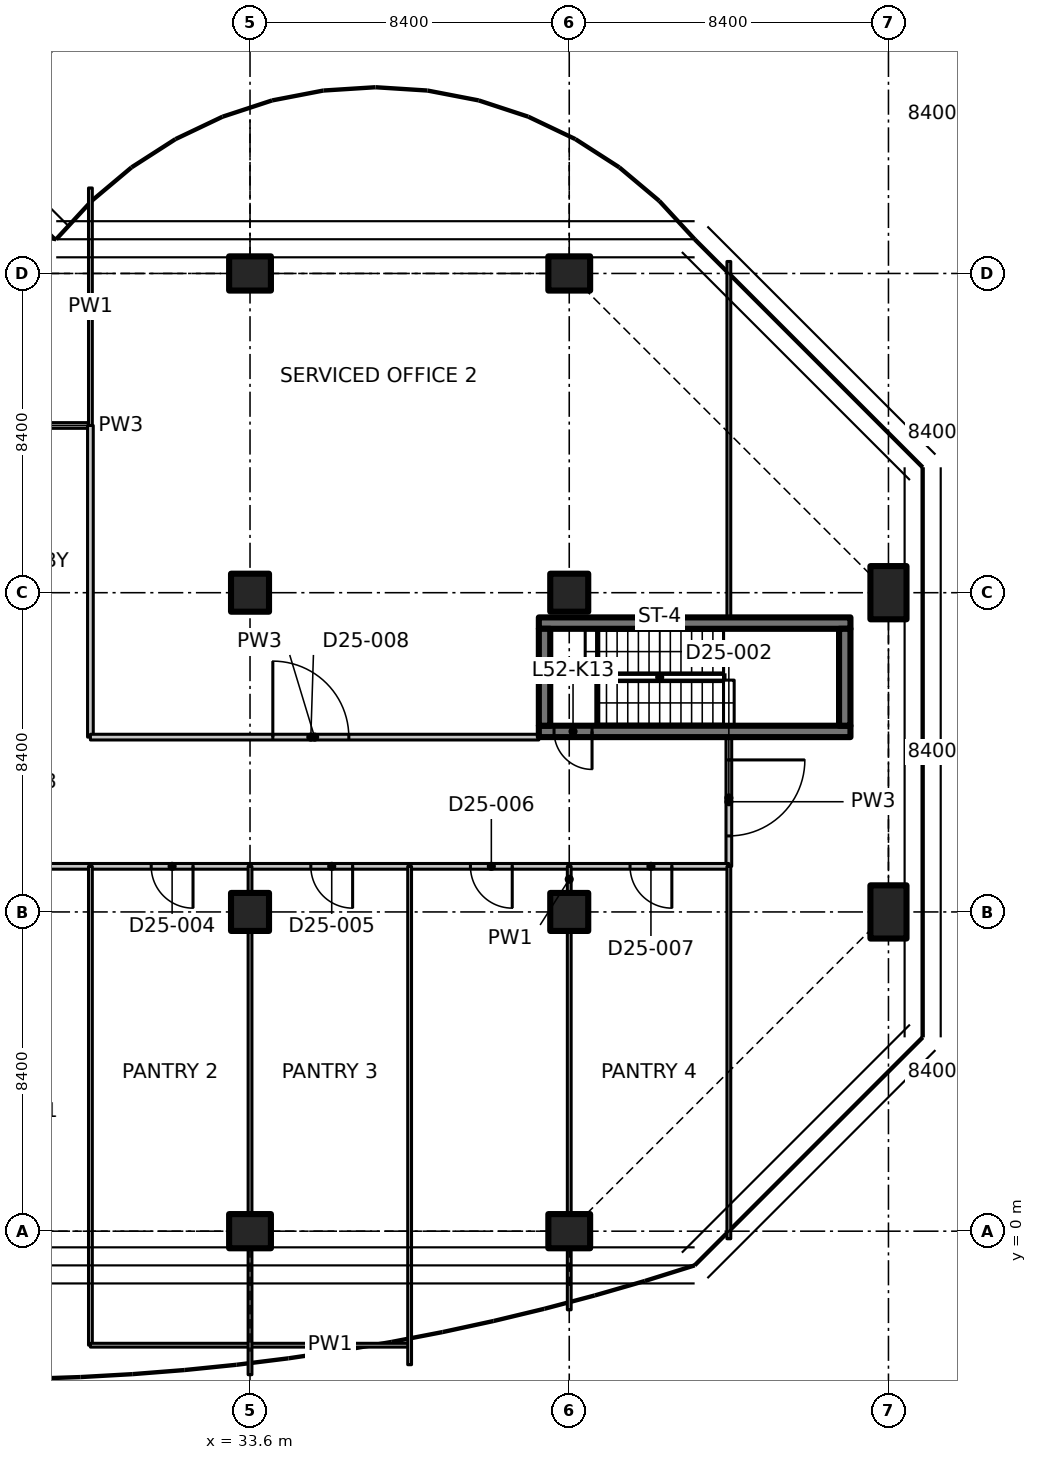
"""IFC4 building model, lengths in metres.
Left out: names, types, materials, properties, quantities, classifications, styles, units other than length and angle.
Written with IfcOpenShell. Run it as: python <this file> out.ifc"""

import sys

from ifc_helpers import new_model, si_unit, direction, frame, frame_2d, origin, origin_2d, place, context, subcontext, project, spatial, polyline, rectangle, outline, extrude, element, fill, save


model = new_model("IFC4")
c1 = context("Model", 3, precision=1e-05, world=origin(), true_north=direction((0.0, 1.0)))
c2 = subcontext(c1, "Body", "Model", "MODEL_VIEW")
j1 = project(units=[si_unit("LENGTHUNIT", "METRE"), si_unit("PLANEANGLEUNIT", "RADIAN")], contexts=[c1])
p1 = place(None, origin())
s1 = spatial("IfcSite", under=j1, at=p1, CompositionType="ELEMENT")
p2 = place(p1, origin())
s2 = spatial("IfcBuilding", under=s1, at=p2, CompositionType="ELEMENT")
p3 = place(p2, frame((0.0, 0.0, 206.4)))
s3 = spatial("IfcBuildingStorey", under=s2, at=p3, CompositionType="ELEMENT", Elevation=206.4)
p4 = place(p3, frame((33.6, 0.0, 0.0), z_axis=(0.0, 0.0, 1.0), x_axis=(0.0, 1.0, 0.0)))
e1 = element("IfcColumn", 1, at=p4, inside=s3, PredefinedType="COLUMN", context=c2, shape_type="SweptSolid", body=[
    extrude(rectangle(XDim=0.9, YDim=1.1, at=origin_2d()), origin(), (0.0, 0.0, 1.0), 4.2),
])
for number, where, z_axis, x_axis in (
    (2, (33.6, 8.4, 0.0), (0.0, 0.0, 1.0), (1.0, 0.0, 0.0)),
    (3, (33.6, 16.8, 0.0), (0.0, 0.0, 1.0), (1.0, 0.0, 0.0)),
):
    element("IfcColumn", number, at=place(p3, frame(where, z_axis=z_axis, x_axis=x_axis)), inside=s3, PredefinedType="COLUMN", context=c2, shape_type="SweptSolid", body=[
        extrude(rectangle(XDim=1.0, YDim=1.0, at=origin_2d()), origin(), (0.0, 0.0, 1.0), 4.2),
    ])
for number, where, z_axis, x_axis in (
    (4, (33.6, 25.2, 0.0), (0.0, 0.0, 1.0), (0.0, 1.0, 0.0)),
    (5, (42.0, 0.0, 0.0), (0.0, 0.0, 1.0), (0.0, 1.0, 0.0)),
):
    element("IfcColumn", number, at=place(p3, frame(where, z_axis=z_axis, x_axis=x_axis)), inside=s3, PredefinedType="COLUMN", context=c2, shape_type="SweptSolid", body=[
        extrude(rectangle(XDim=0.9, YDim=1.1, at=origin_2d()), origin(), (0.0, 0.0, 1.0), 4.2),
    ])
for number, where, z_axis, x_axis in (
    (6, (42.0, 8.4, 0.0), (0.0, 0.0, 1.0), (1.0, 0.0, 0.0)),
    (7, (42.0, 16.8, 0.0), (0.0, 0.0, 1.0), (1.0, 0.0, 0.0)),
):
    element("IfcColumn", number, at=place(p3, frame(where, z_axis=z_axis, x_axis=x_axis)), inside=s3, PredefinedType="COLUMN", context=c2, shape_type="SweptSolid", body=[
        extrude(rectangle(XDim=1.0, YDim=1.0, at=origin_2d()), origin(), (0.0, 0.0, 1.0), 4.2),
    ])
p5 = place(p3, frame((42.0, 25.2, 0.0), z_axis=(0.0, 0.0, 1.0), x_axis=(0.0, 1.0, 0.0)))
e8 = element("IfcColumn", 8, at=p5, inside=s3, PredefinedType="COLUMN", context=c2, shape_type="SweptSolid", body=[
    extrude(rectangle(XDim=0.9, YDim=1.1, at=origin_2d()), origin(), (0.0, 0.0, 1.0), 4.2),
])
for number, where, z_axis, x_axis in (
    (9, (50.4, 8.4, 0.0), (0.0, 0.0, 1.0), (1.0, 0.0, 0.0)),
    (10, (50.4, 16.8, 0.0), (0.0, 0.0, 1.0), (1.0, 0.0, 0.0)),
):
    element("IfcColumn", number, at=place(p3, frame(where, z_axis=z_axis, x_axis=x_axis)), inside=s3, PredefinedType="COLUMN", context=c2, shape_type="SweptSolid", body=[
        extrude(rectangle(XDim=0.95, YDim=1.4, at=origin_2d()), origin(), (0.0, 0.0, 1.0), 4.2),
    ])
p6 = place(p3, frame((27.338, 31.223, 0.0), z_axis=(0.0, 0.0, 1.0), x_axis=(0.540768998311, 0.841171142197, 0.0)))
e11 = element("IfcWall", 11, at=p6, inside=s3, PredefinedType="PARAPET", context=c2, shape_type="SweptSolid", body=[
    extrude(rectangle(XDim=1.082, YDim=1.2, at=frame_2d((0.541, 0.0))), origin(), (0.0, 0.0, 1.0), 1.3),
])
p7 = place(p3, frame((49.4, 13.15, 0.0), z_axis=(0.0, 0.0, 1.0), x_axis=(-1.0, 0.0, 0.0)))
e12 = element("IfcWall", 12, at=p7, inside=s3, PredefinedType="SHEAR", context=c2, shape_type="SweptSolid", body=[
    extrude(rectangle(XDim=8.2, YDim=0.3, at=frame_2d((4.1, 0.0))), origin(), (0.0, 0.0, 1.0), 4.2),
])
p8 = place(p7, frame((6.8, 0.0, 0.0)))
e13 = element("IfcOpeningElement", 13, at=p8, cuts=e12, PredefinedType="OPENING", context=c2, shape_type="SweptSolid", body=[
    extrude(rectangle(XDim=1.0, YDim=2.1, at=frame_2d((0.5, 1.05))), frame((0.0, 0.16, 0.0), z_axis=(0.0, -1.0, 0.0), x_axis=(1.0, 0.0, 0.0)), (0.0, 0.0, 1.0), 0.32),
])
p9 = place(p3, frame((41.2, 16.0, 0.0), z_axis=(0.0, 0.0, 1.0), x_axis=(1.0, 0.0, 0.0)))
e14 = element("IfcWall", 14, at=p9, inside=s3, PredefinedType="SHEAR", context=c2, shape_type="SweptSolid", body=[
    extrude(rectangle(XDim=8.2, YDim=0.3, at=frame_2d((4.1, 0.0))), origin(), (0.0, 0.0, 1.0), 4.2),
])
for number, where, z_axis, x_axis in (
    (15, (41.35, 13.3, 0.0), (0.0, 0.0, 1.0), (0.0, 1.0, 0.0)),
    (16, (49.25, 13.3, 0.0), (0.0, 0.0, 1.0), (0.0, 1.0, 0.0)),
):
    element("IfcWall", number, at=place(p3, frame(where, z_axis=z_axis, x_axis=x_axis)), inside=s3, PredefinedType="SHEAR", context=c2, shape_type="SweptSolid", body=[
        extrude(rectangle(XDim=2.55, YDim=0.3, at=frame_2d((1.275, 0.0))), origin(), (0.0, 0.0, 1.0), 4.2),
    ])
p10 = place(p3, frame((25.2, 21.2, 0.0), z_axis=(0.0, 0.0, 1.0), x_axis=(1.0, 0.0, 0.0)))
e17 = element("IfcWall", 17, at=p10, inside=s3, PredefinedType="PARTITIONING", context=c2, shape_type="SweptSolid", body=[
    extrude(rectangle(XDim=4.2, YDim=0.15, at=frame_2d((2.1, 0.0))), origin(), (0.0, 0.0, 1.0), 4.18),
])
p11 = place(p10, frame((1.5, 0.0, 0.0)))
e18 = element("IfcOpeningElement", 18, at=p11, cuts=e17, PredefinedType="OPENING", context=c2, shape_type="SweptSolid", body=[
    extrude(rectangle(XDim=1.0, YDim=2.1, at=frame_2d((0.5, 1.05))), frame((0.0, 0.085, 0.0), z_axis=(0.0, -1.0, 0.0), x_axis=(1.0, 0.0, 0.0)), (0.0, 0.0, 1.0), 0.17),
])
p12 = place(p3, frame((29.4, 9.6, 0.0), z_axis=(0.0, 0.0, 1.0), x_axis=(-1.0, 0.0, 0.0)))
e19 = element("IfcWall", 19, at=p12, inside=s3, PredefinedType="PARTITIONING", context=c2, shape_type="SweptSolid", body=[
    extrude(rectangle(XDim=4.2, YDim=0.15, at=frame_2d((2.1, 0.0))), origin(), (0.0, 0.0, 1.0), 4.18),
])
p13 = place(p12, frame((1.2, 0.0, 0.0)))
e20 = element("IfcOpeningElement", 20, at=p13, cuts=e19, PredefinedType="OPENING", context=c2, shape_type="SweptSolid", body=[
    extrude(rectangle(XDim=1.6, YDim=2.1, at=frame_2d((0.8, 1.05))), frame((0.0, 0.085, 0.0), z_axis=(0.0, -1.0, 0.0), x_axis=(1.0, 0.0, 0.0)), (0.0, 0.0, 1.0), 0.17),
])
p14 = place(p3, frame((29.4, 21.2, 0.0), z_axis=(0.0, 0.0, 1.0), x_axis=(0.0, -1.0, 0.0)))
e21 = element("IfcWall", 21, at=p14, inside=s3, PredefinedType="PARTITIONING", context=c2, shape_type="SweptSolid", body=[
    extrude(rectangle(XDim=8.2, YDim=0.15, at=frame_2d((4.1, 0.0))), origin(), (0.0, 0.0, 1.0), 4.18),
])
p15 = place(p3, frame((29.4, 27.449, 0.0), z_axis=(0.0, 0.0, 1.0), x_axis=(0.0, -1.0, 0.0)))
e22 = element("IfcWall", 22, at=p15, inside=s3, PredefinedType="PARTITIONING", context=c2, shape_type="SweptSolid", body=[
    extrude(outline(polyline([(0.0, 0.0), (6.25, 0.0), (6.249, 4.18), (2.699, 4.18), (2.697, 3.83), (1.801, 3.83), (1.799, 4.18), (0.174, 4.18), (0.0, 4.18), (0.0, 0.0)])), frame((0.0, 0.05, 0.0), z_axis=(0.0, -1.0, 0.0), x_axis=(1.0, 0.0, 0.0)), (0.0, 0.0, 1.0), 0.1),
])
p16 = place(p3, frame((46.2, 13.0, 0.0), z_axis=(0.0, 0.0, 1.0), x_axis=(0.0, -1.0, 0.0)))
e23 = element("IfcWall", 23, at=p16, inside=s3, PredefinedType="PARTITIONING", context=c2, shape_type="SweptSolid", body=[
    extrude(rectangle(XDim=3.4, YDim=0.15, at=frame_2d((1.7, 0.0))), origin(), (0.0, 0.0, 1.0), 4.18),
])
p17 = place(p16, frame((0.6, 0.0, 0.0)))
e24 = element("IfcOpeningElement", 24, at=p17, cuts=e23, PredefinedType="OPENING", context=c2, shape_type="SweptSolid", body=[
    extrude(rectangle(XDim=2.0, YDim=2.4, at=frame_2d((1.0, 1.2))), frame((0.0, 0.085, 0.0), z_axis=(0.0, -1.0, 0.0), x_axis=(1.0, 0.0, 0.0)), (0.0, 0.0, 1.0), 0.17),
])
p18 = place(p3, frame((33.6, 9.6, 0.0), z_axis=(0.0, 0.0, 1.0), x_axis=(-1.0, 0.0, 0.0)))
e25 = element("IfcWall", 25, at=p18, inside=s3, PredefinedType="PARTITIONING", context=c2, shape_type="SweptSolid", body=[
    extrude(rectangle(XDim=4.2, YDim=0.15, at=frame_2d((2.1, 0.0))), origin(), (0.0, 0.0, 1.0), 4.18),
])
p19 = place(p18, frame((1.5, 0.0, 0.0)))
e26 = element("IfcOpeningElement", 26, at=p19, cuts=e25, PredefinedType="OPENING", context=c2, shape_type="SweptSolid", body=[
    extrude(rectangle(XDim=1.1, YDim=2.1, at=frame_2d((0.55, 1.05))), frame((0.0, 0.085, 0.0), z_axis=(0.0, -1.0, 0.0), x_axis=(1.0, 0.0, 0.0)), (0.0, 0.0, 1.0), 0.17),
])
p20 = place(p3, frame((37.8, 9.6, 0.0), z_axis=(0.0, 0.0, 1.0), x_axis=(-1.0, 0.0, 0.0)))
e27 = element("IfcWall", 27, at=p20, inside=s3, PredefinedType="PARTITIONING", context=c2, shape_type="SweptSolid", body=[
    extrude(rectangle(XDim=4.2, YDim=0.15, at=frame_2d((2.1, 0.0))), origin(), (0.0, 0.0, 1.0), 4.18),
])
p21 = place(p20, frame((1.5, 0.0, 0.0)))
e28 = element("IfcOpeningElement", 28, at=p21, cuts=e27, PredefinedType="OPENING", context=c2, shape_type="SweptSolid", body=[
    extrude(rectangle(XDim=1.1, YDim=2.1, at=frame_2d((0.55, 1.05))), frame((0.0, 0.085, 0.0), z_axis=(0.0, -1.0, 0.0), x_axis=(1.0, 0.0, 0.0)), (0.0, 0.0, 1.0), 0.17),
])
p22 = place(p3, frame((42.0, 9.6, 0.0), z_axis=(0.0, 0.0, 1.0), x_axis=(-1.0, 0.0, 0.0)))
e29 = element("IfcWall", 29, at=p22, inside=s3, PredefinedType="PARTITIONING", context=c2, shape_type="SweptSolid", body=[
    extrude(rectangle(XDim=4.2, YDim=0.15, at=frame_2d((2.1, 0.0))), origin(), (0.0, 0.0, 1.0), 4.18),
])
p23 = place(p22, frame((1.5, 0.0, 0.0)))
e30 = element("IfcOpeningElement", 30, at=p23, cuts=e29, PredefinedType="OPENING", context=c2, shape_type="SweptSolid", body=[
    extrude(rectangle(XDim=1.1, YDim=2.1, at=frame_2d((0.55, 1.05))), frame((0.0, 0.085, 0.0), z_axis=(0.0, -1.0, 0.0), x_axis=(1.0, 0.0, 0.0)), (0.0, 0.0, 1.0), 0.17),
])
p24 = place(p3, frame((46.2, 9.6, 0.0), z_axis=(0.0, 0.0, 1.0), x_axis=(-1.0, 0.0, 0.0)))
e31 = element("IfcWall", 31, at=p24, inside=s3, PredefinedType="PARTITIONING", context=c2, shape_type="SweptSolid", body=[
    extrude(rectangle(XDim=4.2, YDim=0.15, at=frame_2d((2.1, 0.0))), origin(), (0.0, 0.0, 1.0), 4.18),
])
p25 = place(p24, frame((1.5, 0.0, 0.0)))
e32 = element("IfcOpeningElement", 32, at=p25, cuts=e31, PredefinedType="OPENING", context=c2, shape_type="SweptSolid", body=[
    extrude(rectangle(XDim=1.1, YDim=2.1, at=frame_2d((0.55, 1.05))), frame((0.0, 0.085, 0.0), z_axis=(0.0, -1.0, 0.0), x_axis=(1.0, 0.0, 0.0)), (0.0, 0.0, 1.0), 0.17),
])
p26 = place(p3, frame((29.4, 13.0, 0.0), z_axis=(0.0, 0.0, 1.0), x_axis=(1.0, 0.0, 0.0)))
e33 = element("IfcWall", 33, at=p26, inside=s3, PredefinedType="PARTITIONING", context=c2, shape_type="SweptSolid", body=[
    extrude(rectangle(XDim=11.8, YDim=0.15, at=frame_2d((5.9, 0.0))), origin(), (0.0, 0.0, 1.0), 4.18),
])
p27 = place(p26, frame((4.8, 0.0, 0.0)))
e34 = element("IfcOpeningElement", 34, at=p27, cuts=e33, PredefinedType="OPENING", context=c2, shape_type="SweptSolid", body=[
    extrude(rectangle(XDim=2.0, YDim=2.4, at=frame_2d((1.0, 1.2))), frame((0.0, 0.085, 0.0), z_axis=(0.0, -1.0, 0.0), x_axis=(1.0, 0.0, 0.0)), (0.0, 0.0, 1.0), 0.17),
])
p28 = place(p3, frame((46.2, -0.2, 0.0), z_axis=(0.0, 0.0, 1.0), x_axis=(0.0, 1.0, 0.0)))
e35 = element("IfcWall", 35, at=p28, inside=s3, PredefinedType="PARTITIONING", context=c2, shape_type="SweptSolid", body=[
    extrude(outline(polyline([(0.0, 0.0), (9.8, 0.0), (9.8, 4.18), (5.066, 4.18), (5.064, 3.83), (3.736, 3.83), (3.734, 4.18), (0.0, 4.18), (0.0, 0.0)])), frame((0.0, 0.05, 0.0), z_axis=(0.0, -1.0, 0.0), x_axis=(1.0, 0.0, 0.0)), (0.0, 0.0, 1.0), 0.1),
])
p29 = place(p3, frame((46.2, 16.15, 0.0), z_axis=(0.0, 0.0, 1.0), x_axis=(0.0, 1.0, 0.0)))
e36 = element("IfcWall", 36, at=p29, inside=s3, PredefinedType="PARTITIONING", context=c2, shape_type="SweptSolid", body=[
    extrude(outline(polyline([(0.0, 0.0), (9.365, 0.0), (9.365, 4.18), (9.25, 4.18), (5.516, 4.18), (5.514, 3.83), (4.186, 3.83), (4.184, 4.18), (0.0, 4.18), (0.0, 0.0)])), frame((0.0, 0.05, 0.0), z_axis=(0.0, -1.0, 0.0), x_axis=(1.0, 0.0, 0.0)), (0.0, 0.0, 1.0), 0.1),
])
p30 = place(p3, frame((29.4, 9.6, 0.0), z_axis=(0.0, 0.0, 1.0), x_axis=(0.0, -1.0, 0.0)))
e37 = element("IfcWall", 37, at=p30, inside=s3, PredefinedType="PARTITIONING", context=c2, shape_type="SweptSolid", body=[
    extrude(outline(polyline([(0.0, 0.0), (12.6, 0.0), (12.6, 4.18), (10.05, 4.18), (10.048, 3.83), (9.152, 3.83), (9.15, 4.18), (0.0, 4.18), (0.0, 0.0)])), frame((0.0, 0.05, 0.0), z_axis=(0.0, -1.0, 0.0), x_axis=(1.0, 0.0, 0.0)), (0.0, 0.0, 1.0), 0.1),
])
p31 = place(p3, frame((29.4, -3.0, 0.0), z_axis=(0.0, 0.0, 1.0), x_axis=(1.0, 0.0, 0.0)))
e38 = element("IfcWall", 38, at=p31, inside=s3, PredefinedType="PARTITIONING", context=c2, shape_type="SweptSolid", body=[
    extrude(rectangle(XDim=4.2, YDim=0.1, at=frame_2d((2.1, 0.0))), origin(), (0.0, 0.0, 1.0), 3.83),
])
p32 = place(p3, frame((33.6, -3.0, 0.0), z_axis=(0.0, 0.0, 1.0), x_axis=(1.0, 0.0, 0.0)))
e39 = element("IfcWall", 39, at=p32, inside=s3, PredefinedType="PARTITIONING", context=c2, shape_type="SweptSolid", body=[
    extrude(rectangle(XDim=4.216, YDim=0.1, at=frame_2d((2.108, 0.0))), origin(), (0.0, 0.0, 1.0), 3.83),
])
p33 = place(p3, frame((33.6, 9.6, 0.0), z_axis=(0.0, 0.0, 1.0), x_axis=(0.0, -1.0, 0.0)))
e40 = element("IfcWall", 40, at=p33, inside=s3, PredefinedType="PARTITIONING", context=c2, shape_type="SweptSolid", body=[
    extrude(rectangle(XDim=0.68, YDim=0.1, at=frame_2d((0.34, 0.0))), origin(), (0.0, 0.0, 1.0), 4.18),
])
p34 = place(p3, frame((33.6, 7.88, 0.0), z_axis=(0.0, 0.0, 1.0), x_axis=(0.0, -1.0, 0.0)))
e41 = element("IfcWall", 41, at=p34, inside=s3, PredefinedType="PARTITIONING", context=c2, shape_type="SweptSolid", body=[
    extrude(rectangle(XDim=7.41, YDim=0.1, at=frame_2d((3.705, 0.0))), origin(), (0.0, 0.0, 1.0), 4.18),
])
p35 = place(p3, frame((33.6, -0.47, 0.0), z_axis=(0.0, 0.0, 1.0), x_axis=(0.0, -1.0, 0.0)))
e42 = element("IfcWall", 42, at=p35, inside=s3, PredefinedType="PARTITIONING", context=c2, shape_type="SweptSolid", body=[
    extrude(rectangle(XDim=3.307, YDim=0.1, at=frame_2d((1.653, 0.0))), origin(), (0.0, 0.0, 1.0), 3.83),
])
p36 = place(p3, frame((37.8, 9.6, 0.0), z_axis=(0.0, 0.0, 1.0), x_axis=(0.0, -1.0, 0.0)))
e43 = element("IfcWall", 43, at=p36, inside=s3, PredefinedType="PARTITIONING", context=c2, shape_type="SweptSolid", body=[
    extrude(outline(polyline([(0.0, 0.0), (13.114, 0.0), (13.113, 4.18), (12.622, 4.18), (10.05, 4.18), (10.048, 3.83), (9.152, 3.83), (9.15, 4.18), (0.0, 4.18), (0.0, 0.0)])), frame((0.0, 0.05, 0.0), z_axis=(0.0, -1.0, 0.0), x_axis=(1.0, 0.0, 0.0)), (0.0, 0.0, 1.0), 0.1),
])
p37 = place(p3, frame((42.0, 9.6, 0.0), z_axis=(0.0, 0.0, 1.0), x_axis=(0.0, -1.0, 0.0)))
e44 = element("IfcWall", 44, at=p37, inside=s3, PredefinedType="PARTITIONING", context=c2, shape_type="SweptSolid", body=[
    extrude(rectangle(XDim=0.68, YDim=0.1, at=frame_2d((0.34, 0.0))), origin(), (0.0, 0.0, 1.0), 4.18),
])
p38 = place(p3, frame((42.0, 7.88, 0.0), z_axis=(0.0, 0.0, 1.0), x_axis=(0.0, -1.0, 0.0)))
e45 = element("IfcWall", 45, at=p38, inside=s3, PredefinedType="PARTITIONING", context=c2, shape_type="SweptSolid", body=[
    extrude(outline(polyline([(0.0, 0.0), (7.41, 0.0), (7.41, 3.83), (7.216, 3.83), (7.214, 4.18), (0.0, 4.18), (0.0, 0.0)])), frame((0.0, 0.05, 0.0), z_axis=(0.0, -1.0, 0.0), x_axis=(1.0, 0.0, 0.0)), (0.0, 0.0, 1.0), 0.1),
])
p39 = place(p3, frame((42.0, -0.47, 0.0), z_axis=(0.0, 0.0, 1.0), x_axis=(0.0, -1.0, 0.0)))
e46 = element("IfcWall", 46, at=p39, inside=s3, PredefinedType="PARTITIONING", context=c2, shape_type="SweptSolid", body=[
    extrude(rectangle(XDim=1.599, YDim=0.1, at=frame_2d((0.799, 0.0))), origin(), (0.0, 0.0, 1.0), 3.83),
])
p40 = place(p8, origin())
e47 = element("IfcDoor", 47, at=p40, inside=s3, OperationType="SINGLE_SWING_RIGHT", PredefinedType="DOOR", context=c2, shape_type="SweptSolid", body=[
    extrude(rectangle(XDim=1.0, YDim=2.1, at=frame_2d((0.5, 1.05))), frame((0.0, 0.025, 0.0), z_axis=(0.0, -1.0, 0.0), x_axis=(1.0, 0.0, 0.0)), (0.0, 0.0, 1.0), 0.05),
])
fill(e13, e47)
p41 = place(p17, origin())
e48 = element("IfcDoor", 48, at=p41, inside=s3, OperationType="DOUBLE_DOOR_SINGLE_SWING", PredefinedType="DOOR", context=c2, shape_type="SweptSolid", body=[
    extrude(rectangle(XDim=2.0, YDim=2.4, at=frame_2d((1.0, 1.2))), frame((0.0, 0.025, 0.0), z_axis=(0.0, -1.0, 0.0), x_axis=(1.0, 0.0, 0.0)), (0.0, 0.0, 1.0), 0.05),
])
fill(e24, e48)
p42 = place(p19, origin())
e49 = element("IfcDoor", 49, at=p42, inside=s3, OperationType="SINGLE_SWING_LEFT", PredefinedType="DOOR", context=c2, shape_type="SweptSolid", body=[
    extrude(rectangle(XDim=1.1, YDim=2.1, at=frame_2d((0.55, 1.05))), frame((0.0, 0.025, 0.0), z_axis=(0.0, -1.0, 0.0), x_axis=(1.0, 0.0, 0.0)), (0.0, 0.0, 1.0), 0.05),
])
fill(e26, e49)
p43 = place(p21, origin())
e50 = element("IfcDoor", 50, at=p43, inside=s3, OperationType="SINGLE_SWING_LEFT", PredefinedType="DOOR", context=c2, shape_type="SweptSolid", body=[
    extrude(rectangle(XDim=1.1, YDim=2.1, at=frame_2d((0.55, 1.05))), frame((0.0, 0.025, 0.0), z_axis=(0.0, -1.0, 0.0), x_axis=(1.0, 0.0, 0.0)), (0.0, 0.0, 1.0), 0.05),
])
fill(e28, e50)
p44 = place(p23, origin())
e51 = element("IfcDoor", 51, at=p44, inside=s3, OperationType="SINGLE_SWING_LEFT", PredefinedType="DOOR", context=c2, shape_type="SweptSolid", body=[
    extrude(rectangle(XDim=1.1, YDim=2.1, at=frame_2d((0.55, 1.05))), frame((0.0, 0.025, 0.0), z_axis=(0.0, -1.0, 0.0), x_axis=(1.0, 0.0, 0.0)), (0.0, 0.0, 1.0), 0.05),
])
fill(e30, e51)
p45 = place(p25, origin())
e52 = element("IfcDoor", 52, at=p45, inside=s3, OperationType="SINGLE_SWING_LEFT", PredefinedType="DOOR", context=c2, shape_type="SweptSolid", body=[
    extrude(rectangle(XDim=1.1, YDim=2.1, at=frame_2d((0.55, 1.05))), frame((0.0, 0.025, 0.0), z_axis=(0.0, -1.0, 0.0), x_axis=(1.0, 0.0, 0.0)), (0.0, 0.0, 1.0), 0.05),
])
fill(e32, e52)
p46 = place(p27, origin())
e53 = element("IfcDoor", 53, at=p46, inside=s3, OperationType="DOUBLE_DOOR_SINGLE_SWING", PredefinedType="DOOR", context=c2, shape_type="SweptSolid", body=[
    extrude(rectangle(XDim=2.0, YDim=2.4, at=frame_2d((1.0, 1.2))), frame((0.0, 0.025, 0.0), z_axis=(0.0, -1.0, 0.0), x_axis=(1.0, 0.0, 0.0)), (0.0, 0.0, 1.0), 0.05),
])
fill(e34, e53)
save(model, sys.argv[1])
